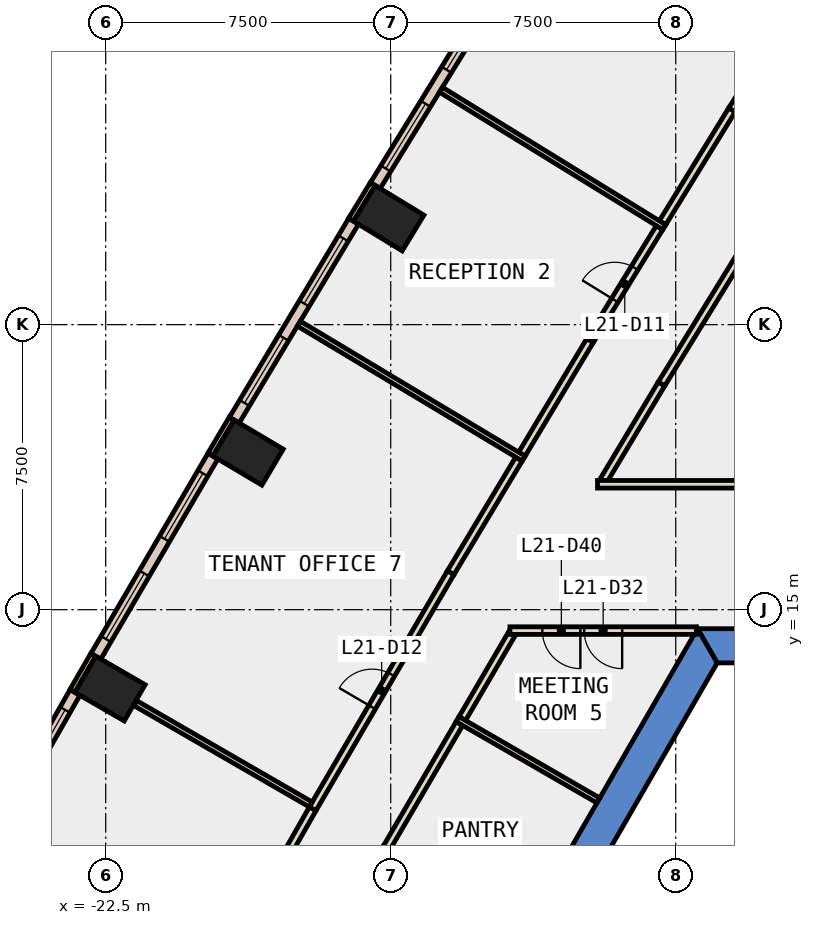
"""IFC4 building model, lengths in metres.
Left out: names, types, materials, properties, quantities, classifications, styles, units other than length and angle.
Written with IfcOpenShell. Run it as: python <this file> out.ifc"""

import sys

from ifc_helpers import new_model, si_unit, direction, frame, frame_2d, origin, origin_2d, place, context, subcontext, project, spatial, polyline, rectangle, outline, extrude, element, fill, save


model = new_model("IFC4")
c1 = context("Model", 3, precision=1e-05, world=origin(), true_north=direction((0.0, 1.0)))
c2 = subcontext(c1, "Body", "Model", "MODEL_VIEW")
j1 = project(units=[si_unit("LENGTHUNIT", "METRE"), si_unit("PLANEANGLEUNIT", "RADIAN")], contexts=[c1])
p1 = place(None, origin())
s1 = spatial("IfcSite", under=j1, at=p1, CompositionType="ELEMENT")
p2 = place(p1, origin())
s2 = spatial("IfcBuilding", under=s1, at=p2, CompositionType="ELEMENT")
p3 = place(p2, frame((0.0, 0.0, 99.2)))
s3 = spatial("IfcBuildingStorey", under=s2, at=p3, CompositionType="ELEMENT", Elevation=99.2)
for number, where, z_axis, x_axis in (
    (1, (-15.053, 25.302, -0.4), (0.0, 0.0, 1.0), (0.52, 0.854, 0.0)),
    (2, (-18.755, 19.134, -0.4), (0.0, 0.0, 1.0), (0.51, 0.86, 0.0)),
    (3, (-22.387, 12.925, -0.4), (0.0, 0.0, 1.0), (0.5, 0.866, 0.0)),
):
    element("IfcColumn", number, at=place(p3, frame(where, z_axis=z_axis, x_axis=x_axis)), inside=s3, PredefinedType="COLUMN", context=c2, shape_type="SweptSolid", body=[
        extrude(rectangle(XDim=1.1, YDim=1.5, at=origin_2d()), origin(), (0.0, 0.0, 1.0), 4.2),
    ])
p4 = place(p3, frame((0.0, 0.0, -0.4)))
e4 = element("IfcWall", 4, at=p4, inside=s3, PredefinedType="SHEAR", context=c2, shape_type="SweptSolid", body=[
    extrude(outline(polyline([(-4.55, 13.6), (-4.55, 14.5), (-6.928, 14.5), (-6.409, 13.6), (-4.55, 13.6)])), origin(), (0.0, 0.0, 1.0), 4.2),
])
p5 = place(p3, frame((0.0, 0.0, -0.4)))
e5 = element("IfcWall", 5, at=p5, inside=s3, PredefinedType="SHEAR", context=c2, shape_type="SweptSolid", body=[
    extrude(outline(polyline([(-12.267, 5.252), (-11.488, 4.802), (-6.409, 13.6), (-6.928, 14.5), (-12.267, 5.252)])), origin(), (0.0, 0.0, 1.0), 4.2),
])
p6 = place(p3, frame((-15.472, 26.201, 0.0), z_axis=(0.0, 0.0, 1.0), x_axis=(-0.519869515594, -0.854245682901, 0.0)))
e6 = element("IfcWall", 6, at=p6, inside=s3, PredefinedType="STANDARD", context=c2, shape_type="SweptSolid", body=[
    extrude(rectangle(XDim=1.1, YDim=0.15, at=frame_2d((0.55, 0.0))), origin(), (0.0, 0.0, 1.0), 3.8),
])
p7 = place(p3, frame((-19.184, 20.028, 0.0), z_axis=(0.0, 0.0, 1.0), x_axis=(-0.510082245696, -0.860125631885, 0.0)))
e7 = element("IfcWall", 7, at=p7, inside=s3, PredefinedType="STANDARD", context=c2, shape_type="SweptSolid", body=[
    extrude(rectangle(XDim=1.1, YDim=0.15, at=frame_2d((0.55, 0.0))), origin(), (0.0, 0.0, 1.0), 3.8),
])
p8 = place(p3, frame((-22.826, 13.814, 0.0), z_axis=(0.0, 0.0, 1.0), x_axis=(-0.499933745558, -0.866063652425, 0.0)))
e8 = element("IfcWall", 8, at=p8, inside=s3, PredefinedType="STANDARD", context=c2, shape_type="SweptSolid", body=[
    extrude(rectangle(XDim=1.1, YDim=0.15, at=frame_2d((0.55, 0.0))), origin(), (0.0, 0.0, 1.0), 3.8),
])
p9 = place(p3, frame((-12.207, 31.358, 0.0), z_axis=(0.0, 0.0, 1.0), x_axis=(-0.524121974895, -0.851643208998, 0.0)))
e9 = element("IfcWall", 9, at=p9, inside=s3, PredefinedType="STANDARD", context=c2, shape_type="SweptSolid", body=[
    extrude(rectangle(XDim=6.104, YDim=0.3, at=frame_2d((3.052, 0.0))), origin(), (0.0, 0.0, 1.0), 3.8),
])
p10 = place(p9, frame((0.526, 0.0, 0.9)))
e10 = element("IfcOpeningElement", 10, at=p10, cuts=e9, PredefinedType="OPENING", context=c2, shape_type="SweptSolid", body=[
    extrude(rectangle(XDim=2.0, YDim=2.6, at=frame_2d((1.0, 1.3))), frame((0.0, 0.16, 0.0), z_axis=(0.0, -1.0, 0.0), x_axis=(1.0, 0.0, 0.0)), (0.0, 0.0, 1.0), 0.32),
])
p11 = place(p9, frame((3.578, 0.0, 0.9)))
e11 = element("IfcOpeningElement", 11, at=p11, cuts=e9, PredefinedType="OPENING", context=c2, shape_type="SweptSolid", body=[
    extrude(rectangle(XDim=2.0, YDim=2.6, at=frame_2d((1.0, 1.3))), frame((0.0, 0.16, 0.0), z_axis=(0.0, -1.0, 0.0), x_axis=(1.0, 0.0, 0.0)), (0.0, 0.0, 1.0), 0.32),
])
p12 = place(p3, frame((-15.976, 25.221, 0.0), z_axis=(0.0, 0.0, 1.0), x_axis=(-0.514560454873, -0.857454102726, 0.0)))
e12 = element("IfcWall", 12, at=p12, inside=s3, PredefinedType="STANDARD", context=c2, shape_type="SweptSolid", body=[
    extrude(rectangle(XDim=6.104, YDim=0.3, at=frame_2d((3.052, 0.0))), origin(), (0.0, 0.0, 1.0), 3.8),
])
p13 = place(p12, frame((0.526, 0.0, 0.9)))
e13 = element("IfcOpeningElement", 13, at=p13, cuts=e12, PredefinedType="OPENING", context=c2, shape_type="SweptSolid", body=[
    extrude(rectangle(XDim=2.0, YDim=2.6, at=frame_2d((1.0, 1.3))), frame((0.0, 0.16, 0.0), z_axis=(0.0, -1.0, 0.0), x_axis=(1.0, 0.0, 0.0)), (0.0, 0.0, 1.0), 0.32),
])
p14 = place(p12, frame((3.578, 0.0, 0.9)))
e14 = element("IfcOpeningElement", 14, at=p14, cuts=e12, PredefinedType="OPENING", context=c2, shape_type="SweptSolid", body=[
    extrude(rectangle(XDim=2.0, YDim=2.6, at=frame_2d((1.0, 1.3))), frame((0.0, 0.16, 0.0), z_axis=(0.0, -1.0, 0.0), x_axis=(1.0, 0.0, 0.0)), (0.0, 0.0, 1.0), 0.32),
])
p15 = place(p3, frame((-19.677, 19.043, 0.0), z_axis=(0.0, 0.0, 1.0), x_axis=(-0.50490018297, -0.863177736759, 0.0)))
e15 = element("IfcWall", 15, at=p15, inside=s3, PredefinedType="STANDARD", context=c2, shape_type="SweptSolid", body=[
    extrude(rectangle(XDim=6.104, YDim=0.3, at=frame_2d((3.052, 0.0))), origin(), (0.0, 0.0, 1.0), 3.8),
])
p16 = place(p15, frame((0.526, 0.0, 0.9)))
e16 = element("IfcOpeningElement", 16, at=p16, cuts=e15, PredefinedType="OPENING", context=c2, shape_type="SweptSolid", body=[
    extrude(rectangle(XDim=2.0, YDim=2.6, at=frame_2d((1.0, 1.3))), frame((0.0, 0.16, 0.0), z_axis=(0.0, -1.0, 0.0), x_axis=(1.0, 0.0, 0.0)), (0.0, 0.0, 1.0), 0.32),
])
p17 = place(p15, frame((3.578, 0.0, 0.9)))
e17 = element("IfcOpeningElement", 17, at=p17, cuts=e15, PredefinedType="OPENING", context=c2, shape_type="SweptSolid", body=[
    extrude(rectangle(XDim=2.0, YDim=2.6, at=frame_2d((1.0, 1.3))), frame((0.0, 0.16, 0.0), z_axis=(0.0, -1.0, 0.0), x_axis=(1.0, 0.0, 0.0)), (0.0, 0.0, 1.0), 0.32),
])
p18 = place(p3, frame((-23.308, 12.823, 0.0), z_axis=(0.0, 0.0, 1.0), x_axis=(-0.495113375427, -0.868828375154, 0.0)))
e18 = element("IfcWall", 18, at=p18, inside=s3, PredefinedType="STANDARD", context=c2, shape_type="SweptSolid", body=[
    extrude(rectangle(XDim=6.104, YDim=0.3, at=frame_2d((3.052, 0.0))), origin(), (0.0, 0.0, 1.0), 3.8),
])
p19 = place(p18, frame((0.526, 0.0, 0.9)))
e19 = element("IfcOpeningElement", 19, at=p19, cuts=e18, PredefinedType="OPENING", context=c2, shape_type="SweptSolid", body=[
    extrude(rectangle(XDim=2.0, YDim=2.6, at=frame_2d((1.0, 1.3))), frame((0.0, 0.16, 0.0), z_axis=(0.0, -1.0, 0.0), x_axis=(1.0, 0.0, 0.0)), (0.0, 0.0, 1.0), 0.32),
])
p20 = place(p18, frame((3.578, 0.0, 0.9)))
e20 = element("IfcOpeningElement", 20, at=p20, cuts=e18, PredefinedType="OPENING", context=c2, shape_type="SweptSolid", body=[
    extrude(rectangle(XDim=2.0, YDim=2.6, at=frame_2d((1.0, 1.3))), frame((0.0, 0.16, 0.0), z_axis=(0.0, -1.0, 0.0), x_axis=(1.0, 0.0, 0.0)), (0.0, 0.0, 1.0), 0.32),
])
p21 = place(p3, frame((-11.814, 14.364, 0.0), z_axis=(0.0, 0.0, 1.0), x_axis=(-0.504658640018, -0.863318977583, 0.0)))
e21 = element("IfcWall", 21, at=p21, inside=s3, PredefinedType="PARTITIONING", context=c2, shape_type="SweptSolid", body=[
    extrude(rectangle(XDim=2.582, YDim=0.2, at=frame_2d((1.291, 0.0))), origin(), (0.0, 0.0, 1.0), 3.8),
])
p22 = place(p3, frame((-13.193, 12.005, 0.0), z_axis=(0.0, 0.0, 1.0), x_axis=(-0.50499711829, -0.863121028894, 0.0)))
e22 = element("IfcWall", 22, at=p22, inside=s3, PredefinedType="PARTITIONING", context=c2, shape_type="SweptSolid", body=[
    extrude(rectangle(XDim=3.8, YDim=0.2, at=frame_2d((1.9, 0.0))), origin(), (0.0, 0.0, 1.0), 3.8),
])
p23 = place(p3, frame((-4.154, 26.985, 0.0), z_axis=(0.0, 0.0, 1.0), x_axis=(-0.524183774504, -0.851605172921, 0.0)))
e23 = element("IfcWall", 23, at=p23, inside=s3, PredefinedType="PARTITIONING", context=c2, shape_type="SweptSolid", body=[
    extrude(rectangle(XDim=7.099, YDim=0.2, at=frame_2d((3.549, 0.0))), origin(), (0.0, 0.0, 1.0), 3.8),
])
p24 = place(p3, frame((-7.875, 20.94, 0.0), z_axis=(0.0, 0.0, 1.0), x_axis=(-0.514399309837, -0.857550785691, 0.0)))
e24 = element("IfcWall", 24, at=p24, inside=s3, PredefinedType="PARTITIONING", context=c2, shape_type="SweptSolid", body=[
    extrude(rectangle(XDim=2.978, YDim=0.2, at=frame_2d((1.489, 0.0))), origin(), (0.0, 0.0, 1.0), 3.8),
])
p25 = place(p3, frame((-7.848, 25.18, 0.0), z_axis=(0.0, 0.0, 1.0), x_axis=(0.524062258075, 0.851679957297, 0.0)))
e25 = element("IfcWall", 25, at=p25, inside=s3, PredefinedType="PARTITIONING", context=c2, shape_type="SweptSolid", body=[
    extrude(rectangle(XDim=3.486, YDim=0.2, at=frame_2d((1.743, 0.0))), origin(), (0.0, 0.0, 1.0), 3.8),
])
p26 = place(p3, frame((-6.021, 28.149, 0.0), z_axis=(0.0, 0.0, 1.0), x_axis=(0.533874165031, 0.845563939577, 0.0)))
e26 = element("IfcWall", 26, at=p26, inside=s3, PredefinedType="PARTITIONING", context=c2, shape_type="SweptSolid", body=[
    extrude(rectangle(XDim=6.571, YDim=0.2, at=frame_2d((3.286, 0.0))), origin(), (0.0, 0.0, 1.0), 3.8),
])
p27 = place(p26, frame((2.785, 0.0, 0.0)))
e27 = element("IfcOpeningElement", 27, at=p27, cuts=e26, PredefinedType="OPENING", context=c2, shape_type="SweptSolid", body=[
    extrude(rectangle(XDim=1.0, YDim=2.1, at=frame_2d((0.5, 1.05))), frame((0.0, 0.11, 0.0), z_axis=(0.0, -1.0, 0.0), x_axis=(1.0, 0.0, 0.0)), (0.0, 0.0, 1.0), 0.22),
])
p28 = place(p3, frame((-11.549, 19.092, 0.0), z_axis=(0.0, 0.0, 1.0), x_axis=(0.514536939864, 0.857468213705, 0.0)))
e28 = element("IfcWall", 28, at=p28, inside=s3, PredefinedType="PARTITIONING", context=c2, shape_type="SweptSolid", body=[
    extrude(rectangle(XDim=3.487, YDim=0.2, at=frame_2d((1.744, 0.0))), origin(), (0.0, 0.0, 1.0), 3.8),
])
p29 = place(p3, frame((-9.755, 22.082, 0.0), z_axis=(0.0, 0.0, 1.0), x_axis=(0.524140390501, 0.851631875311, 0.0)))
e29 = element("IfcWall", 29, at=p29, inside=s3, PredefinedType="PARTITIONING", context=c2, shape_type="SweptSolid", body=[
    extrude(rectangle(XDim=3.487, YDim=0.2, at=frame_2d((1.744, 0.0))), origin(), (0.0, 0.0, 1.0), 3.8),
])
p30 = place(p29, frame((1.244, 0.0, 0.0)))
e30 = element("IfcOpeningElement", 30, at=p30, cuts=e29, PredefinedType="OPENING", context=c2, shape_type="SweptSolid", body=[
    extrude(rectangle(XDim=1.0, YDim=2.1, at=frame_2d((0.5, 1.05))), frame((0.0, 0.11, 0.0), z_axis=(0.0, -1.0, 0.0), x_axis=(1.0, 0.0, 0.0)), (0.0, 0.0, 1.0), 0.22),
])
p31 = place(p3, frame((-17.055, 9.76, 0.0), z_axis=(0.0, 0.0, 1.0), x_axis=(0.504817517618, 0.863226085047, 0.0)))
e31 = element("IfcWall", 31, at=p31, inside=s3, PredefinedType="PARTITIONING", context=c2, shape_type="SweptSolid", body=[
    extrude(rectangle(XDim=7.199, YDim=0.2, at=frame_2d((3.599, 0.0))), origin(), (0.0, 0.0, 1.0), 3.8),
])
p32 = place(p31, frame((3.099, 0.0, 0.0)))
e32 = element("IfcOpeningElement", 32, at=p32, cuts=e31, PredefinedType="OPENING", context=c2, shape_type="SweptSolid", body=[
    extrude(rectangle(XDim=1.0, YDim=2.1, at=frame_2d((0.5, 1.05))), frame((0.0, 0.11, 0.0), z_axis=(0.0, -1.0, 0.0), x_axis=(1.0, 0.0, 0.0)), (0.0, 0.0, 1.0), 0.22),
])
p33 = place(p3, frame((-13.421, 15.974, 0.0), z_axis=(0.0, 0.0, 1.0), x_axis=(0.514691349792, 0.857375538751, 0.0)))
e33 = element("IfcWall", 33, at=p33, inside=s3, PredefinedType="PARTITIONING", context=c2, shape_type="SweptSolid", body=[
    extrude(rectangle(XDim=3.487, YDim=0.2, at=frame_2d((1.744, 0.0))), origin(), (0.0, 0.0, 1.0), 3.8),
])
p34 = place(p3, frame((-20.581, 3.571, 0.0), z_axis=(0.0, 0.0, 1.0), x_axis=(0.495138372197, 0.868814129937, 0.0)))
e34 = element("IfcWall", 34, at=p34, inside=s3, PredefinedType="PARTITIONING", context=c2, shape_type="SweptSolid", body=[
    extrude(rectangle(XDim=7.124, YDim=0.2, at=frame_2d((3.562, 0.0))), origin(), (0.0, 0.0, 1.0), 3.8),
])
p35 = place(p34, frame((3.137, 0.0, 0.0)))
e35 = element("IfcOpeningElement", 35, at=p35, cuts=e34, PredefinedType="OPENING", context=c2, shape_type="SweptSolid", body=[
    extrude(rectangle(XDim=1.0, YDim=2.1, at=frame_2d((0.5, 1.05))), frame((0.0, 0.11, 0.0), z_axis=(0.0, -1.0, 0.0), x_axis=(1.0, 0.0, 0.0)), (0.0, 0.0, 1.0), 0.22),
])
p36 = place(p3, frame((-9.537, 9.981, 0.0), z_axis=(0.0, 0.0, 1.0), x_axis=(-0.866007866579, 0.5000303741, 0.0)))
e36 = element("IfcWall", 36, at=p36, inside=s3, PredefinedType="PARTITIONING", context=c2, shape_type="SweptSolid", body=[
    extrude(rectangle(XDim=4.278, YDim=0.15, at=frame_2d((2.139, 0.0))), origin(), (0.0, 0.0, 1.0), 3.8),
])
p37 = place(p3, frame((-6.957, 14.45, 0.0), z_axis=(0.0, 0.0, 1.0), x_axis=(-1.0, 0.0, 0.0)))
e37 = element("IfcWall", 37, at=p37, inside=s3, PredefinedType="PARTITIONING", context=c2, shape_type="SweptSolid", body=[
    extrude(rectangle(XDim=4.906, YDim=0.2, at=frame_2d((2.453, 0.0))), origin(), (0.0, 0.0, 1.0), 3.8),
])
p38 = place(p37, frame((1.953, 0.0, 0.0)))
e38 = element("IfcOpeningElement", 38, at=p38, cuts=e37, PredefinedType="OPENING", context=c2, shape_type="SweptSolid", body=[
    extrude(rectangle(XDim=1.0, YDim=2.1, at=frame_2d((0.5, 1.05))), frame((0.0, 0.11, 0.0), z_axis=(0.0, -1.0, 0.0), x_axis=(1.0, 0.0, 0.0)), (0.0, 0.0, 1.0), 0.22),
])
p39 = place(p37, frame((3.053, 0.0, 0.0)))
e39 = element("IfcOpeningElement", 39, at=p39, cuts=e37, PredefinedType="OPENING", context=c2, shape_type="SweptSolid", body=[
    extrude(rectangle(XDim=1.0, YDim=2.1, at=frame_2d((0.5, 1.05))), frame((0.0, 0.11, 0.0), z_axis=(0.0, -1.0, 0.0), x_axis=(1.0, 0.0, 0.0)), (0.0, 0.0, 1.0), 0.22),
])
p40 = place(p3, frame((-9.559, 18.3, 0.0), z_axis=(0.0, 0.0, 1.0), x_axis=(1.0, 0.0, 0.0)))
e40 = element("IfcWall", 40, at=p40, inside=s3, PredefinedType="PARTITIONING", context=c2, shape_type="SweptSolid", body=[
    extrude(rectangle(XDim=9.159, YDim=0.2, at=frame_2d((4.58, 0.0))), origin(), (0.0, 0.0, 1.0), 3.8),
])
p41 = place(p3, frame((-7.802, 25.064, 0.0), z_axis=(0.0, 0.0, 1.0), x_axis=(-0.851596352662, 0.524198103901, 0.0)))
e41 = element("IfcWall", 41, at=p41, inside=s3, PredefinedType="PARTITIONING", context=c2, shape_type="SweptSolid", body=[
    extrude(rectangle(XDim=6.9, YDim=0.15, at=frame_2d((3.45, 0.0))), origin(), (0.0, 0.0, 1.0), 3.8),
])
p42 = place(p3, frame((-11.502, 18.977, 0.0), z_axis=(0.0, 0.0, 1.0), x_axis=(-0.857464824073, 0.514542588595, 0.0)))
e42 = element("IfcWall", 42, at=p42, inside=s3, PredefinedType="PARTITIONING", context=c2, shape_type="SweptSolid", body=[
    extrude(rectangle(XDim=6.899, YDim=0.15, at=frame_2d((3.45, 0.0))), origin(), (0.0, 0.0, 1.0), 3.8),
])
p43 = place(p3, frame((-17.104, 9.875, 0.0), z_axis=(0.0, 0.0, 1.0), x_axis=(-0.866024640963, 0.500001321243, 0.0)))
e43 = element("IfcWall", 43, at=p43, inside=s3, PredefinedType="PARTITIONING", context=c2, shape_type="SweptSolid", body=[
    extrude(rectangle(XDim=5.33, YDim=0.15, at=frame_2d((2.665, 0.0))), origin(), (0.0, 0.0, 1.0), 3.8),
])
p44 = place(p3, frame((-5.03, 9.388, 0.0), z_axis=(0.0, 0.0, 1.0), x_axis=(-0.499978703459, -0.866037698999, 0.0)))
e44 = element("IfcWall", 44, at=p44, inside=s3, PredefinedType="STANDARD", context=c2, shape_type="SweptSolid", body=[
    extrude(rectangle(XDim=6.9, YDim=0.2, at=frame_2d((3.45, 0.0))), origin(), (0.0, 0.0, 1.0), 3.8),
])
p45 = place(p10, origin())
e45 = element("IfcWindow", 45, at=p45, inside=s3, PartitioningType="SINGLE_PANEL", PredefinedType="WINDOW", context=c2, shape_type="SweptSolid", body=[
    extrude(rectangle(XDim=2.0, YDim=2.6, at=frame_2d((1.0, 1.3))), frame((0.0, 0.03, 0.0), z_axis=(0.0, -1.0, 0.0), x_axis=(1.0, 0.0, 0.0)), (0.0, 0.0, 1.0), 0.06),
])
fill(e10, e45)
p46 = place(p11, origin())
e46 = element("IfcWindow", 46, at=p46, inside=s3, PartitioningType="SINGLE_PANEL", PredefinedType="WINDOW", context=c2, shape_type="SweptSolid", body=[
    extrude(rectangle(XDim=2.0, YDim=2.6, at=frame_2d((1.0, 1.3))), frame((0.0, 0.03, 0.0), z_axis=(0.0, -1.0, 0.0), x_axis=(1.0, 0.0, 0.0)), (0.0, 0.0, 1.0), 0.06),
])
fill(e11, e46)
p47 = place(p13, origin())
e47 = element("IfcWindow", 47, at=p47, inside=s3, PartitioningType="SINGLE_PANEL", PredefinedType="WINDOW", context=c2, shape_type="SweptSolid", body=[
    extrude(rectangle(XDim=2.0, YDim=2.6, at=frame_2d((1.0, 1.3))), frame((0.0, 0.03, 0.0), z_axis=(0.0, -1.0, 0.0), x_axis=(1.0, 0.0, 0.0)), (0.0, 0.0, 1.0), 0.06),
])
fill(e13, e47)
p48 = place(p14, origin())
e48 = element("IfcWindow", 48, at=p48, inside=s3, PartitioningType="SINGLE_PANEL", PredefinedType="WINDOW", context=c2, shape_type="SweptSolid", body=[
    extrude(rectangle(XDim=2.0, YDim=2.6, at=frame_2d((1.0, 1.3))), frame((0.0, 0.03, 0.0), z_axis=(0.0, -1.0, 0.0), x_axis=(1.0, 0.0, 0.0)), (0.0, 0.0, 1.0), 0.06),
])
fill(e14, e48)
p49 = place(p16, origin())
e49 = element("IfcWindow", 49, at=p49, inside=s3, PartitioningType="SINGLE_PANEL", PredefinedType="WINDOW", context=c2, shape_type="SweptSolid", body=[
    extrude(rectangle(XDim=2.0, YDim=2.6, at=frame_2d((1.0, 1.3))), frame((0.0, 0.03, 0.0), z_axis=(0.0, -1.0, 0.0), x_axis=(1.0, 0.0, 0.0)), (0.0, 0.0, 1.0), 0.06),
])
fill(e16, e49)
p50 = place(p17, origin())
e50 = element("IfcWindow", 50, at=p50, inside=s3, PartitioningType="SINGLE_PANEL", PredefinedType="WINDOW", context=c2, shape_type="SweptSolid", body=[
    extrude(rectangle(XDim=2.0, YDim=2.6, at=frame_2d((1.0, 1.3))), frame((0.0, 0.03, 0.0), z_axis=(0.0, -1.0, 0.0), x_axis=(1.0, 0.0, 0.0)), (0.0, 0.0, 1.0), 0.06),
])
fill(e17, e50)
p51 = place(p19, origin())
e51 = element("IfcWindow", 51, at=p51, inside=s3, PartitioningType="SINGLE_PANEL", PredefinedType="WINDOW", context=c2, shape_type="SweptSolid", body=[
    extrude(rectangle(XDim=2.0, YDim=2.6, at=frame_2d((1.0, 1.3))), frame((0.0, 0.03, 0.0), z_axis=(0.0, -1.0, 0.0), x_axis=(1.0, 0.0, 0.0)), (0.0, 0.0, 1.0), 0.06),
])
fill(e19, e51)
p52 = place(p30, origin())
e52 = element("IfcDoor", 52, at=p52, inside=s3, OperationType="SINGLE_SWING_LEFT", PredefinedType="DOOR", context=c2, shape_type="SweptSolid", body=[
    extrude(rectangle(XDim=1.0, YDim=2.1, at=frame_2d((0.5, 1.05))), frame((0.0, 0.025, 0.0), z_axis=(0.0, -1.0, 0.0), x_axis=(1.0, 0.0, 0.0)), (0.0, 0.0, 1.0), 0.05),
])
fill(e30, e52)
p53 = place(p32, origin())
e53 = element("IfcDoor", 53, at=p53, inside=s3, OperationType="SINGLE_SWING_LEFT", PredefinedType="DOOR", context=c2, shape_type="SweptSolid", body=[
    extrude(rectangle(XDim=1.0, YDim=2.1, at=frame_2d((0.5, 1.05))), frame((0.0, 0.025, 0.0), z_axis=(0.0, -1.0, 0.0), x_axis=(1.0, 0.0, 0.0)), (0.0, 0.0, 1.0), 0.05),
])
fill(e32, e53)
p54 = place(p38, origin())
e54 = element("IfcDoor", 54, at=p54, inside=s3, OperationType="SINGLE_SWING_LEFT", PredefinedType="DOOR", context=c2, shape_type="SweptSolid", body=[
    extrude(rectangle(XDim=1.0, YDim=2.1, at=frame_2d((0.5, 1.05))), frame((0.0, 0.025, 0.0), z_axis=(0.0, -1.0, 0.0), x_axis=(1.0, 0.0, 0.0)), (0.0, 0.0, 1.0), 0.05),
])
fill(e38, e54)
p55 = place(p39, origin())
e55 = element("IfcDoor", 55, at=p55, inside=s3, OperationType="SINGLE_SWING_RIGHT", PredefinedType="DOOR", context=c2, shape_type="SweptSolid", body=[
    extrude(rectangle(XDim=1.0, YDim=2.1, at=frame_2d((0.5, 1.05))), frame((0.0, 0.025, 0.0), z_axis=(0.0, -1.0, 0.0), x_axis=(1.0, 0.0, 0.0)), (0.0, 0.0, 1.0), 0.05),
])
fill(e39, e55)
save(model, sys.argv[1])
